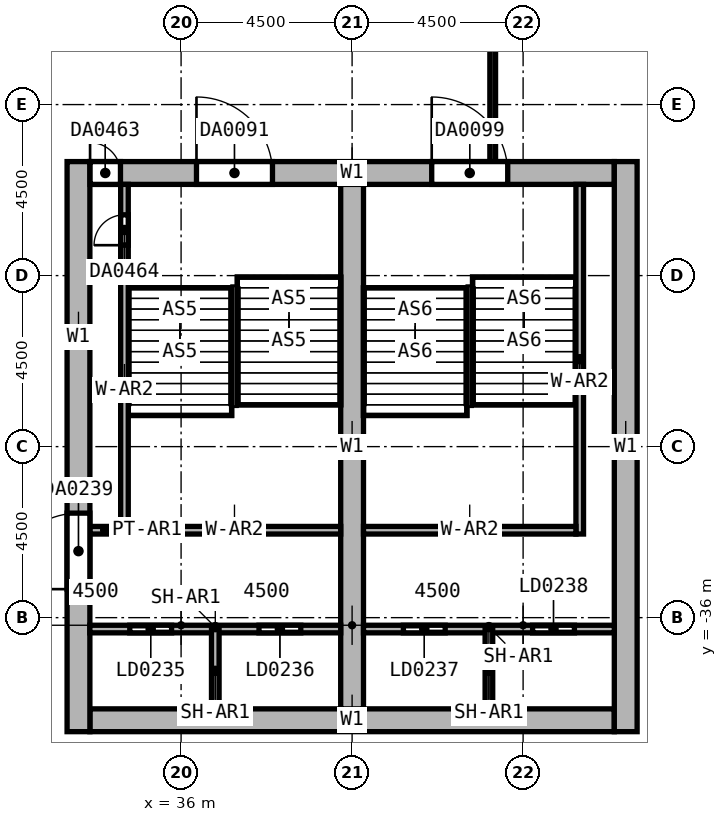
"""IFC4 building model, lengths in metres.
Left out: names, types, materials, properties, quantities, classifications, styles, units other than length and angle.
Written with IfcOpenShell. Run it as: python <this file> out.ifc"""

import sys

from ifc_helpers import new_model, si_unit, direction, frame, frame_2d, origin, place, context, subcontext, project, spatial, rectangle, extrude, element, fill, save


model = new_model("IFC4")
c1 = context("Model", 3, precision=1e-05, world=origin(), true_north=direction((0.0, 1.0)))
c2 = subcontext(c1, "Body", "Model", "MODEL_VIEW")
j1 = project(units=[si_unit("LENGTHUNIT", "METRE"), si_unit("PLANEANGLEUNIT", "RADIAN")], contexts=[c1])
p1 = place(None, origin())
s1 = spatial("IfcSite", under=j1, at=p1, CompositionType="ELEMENT")
p2 = place(p1, origin())
s2 = spatial("IfcBuilding", under=s1, at=p2, CompositionType="ELEMENT")
p3 = place(p2, frame((0.0, 0.0, 44.0)))
s3 = spatial("IfcBuildingStorey", under=s2, at=p3, CompositionType="ELEMENT", Elevation=44.0)
p4 = place(p3, frame((33.6, -24.3, 0.0), z_axis=(0.0, 0.0, 1.0), x_axis=(1.0, 0.0, 0.0)))
e1 = element("IfcWall", 1, at=p4, inside=s3, PredefinedType="SHEAR", context=c2, shape_type="SweptSolid", body=[
    extrude(rectangle(XDim=13.8, YDim=0.6, at=frame_2d((6.9, 0.0))), origin(), (0.0, 0.0, 1.0), 8.0),
])
p5 = place(p4, frame((2.805, 0.0, 0.0)))
e2 = element("IfcOpeningElement", 2, at=p5, cuts=e1, PredefinedType="OPENING", context=c2, shape_type="SweptSolid", body=[
    extrude(rectangle(XDim=2.0, YDim=2.4, at=frame_2d((1.0, 1.2))), frame((0.0, 0.3, 0.0), z_axis=(0.0, -1.0, 0.0), x_axis=(1.0, 0.0, 0.0)), (0.0, 0.0, 1.0), 0.6),
])
p6 = place(p4, frame((8.995, 0.0, 0.0)))
e3 = element("IfcOpeningElement", 3, at=p6, cuts=e1, PredefinedType="OPENING", context=c2, shape_type="SweptSolid", body=[
    extrude(rectangle(XDim=2.0, YDim=2.4, at=frame_2d((1.0, 1.2))), frame((0.0, 0.3, 0.0), z_axis=(0.0, -1.0, 0.0), x_axis=(1.0, 0.0, 0.0)), (0.0, 0.0, 1.0), 0.6),
])
p7 = place(p4, frame((0.005, 0.0, 0.0)))
e4 = element("IfcOpeningElement", 4, at=p7, cuts=e1, PredefinedType="OPENING", context=c2, shape_type="SweptSolid", body=[
    extrude(rectangle(XDim=0.8, YDim=2.1, at=frame_2d((0.4, 1.05))), frame((0.0, 0.3, 0.0), z_axis=(0.0, -1.0, 0.0), x_axis=(1.0, 0.0, 0.0)), (0.0, 0.0, 1.0), 0.6),
])
p8 = place(p3, frame((33.6, -38.7, 0.0), z_axis=(0.0, 0.0, 1.0), x_axis=(1.0, 0.0, 0.0)))
e5 = element("IfcWall", 5, at=p8, inside=s3, PredefinedType="SHEAR", context=c2, shape_type="SweptSolid", body=[
    extrude(rectangle(XDim=13.8, YDim=0.6, at=frame_2d((6.9, 0.0))), origin(), (0.0, 0.0, 1.0), 8.0),
])
p9 = place(p3, frame((33.3, -39.0, 0.0), z_axis=(0.0, 0.0, 1.0), x_axis=(0.0, 1.0, 0.0)))
e6 = element("IfcWall", 6, at=p9, inside=s3, PredefinedType="SHEAR", context=c2, shape_type="SweptSolid", body=[
    extrude(rectangle(XDim=15.0, YDim=0.6, at=frame_2d((7.5, 0.0))), origin(), (0.0, 0.0, 1.0), 8.0),
])
p10 = place(p9, frame((3.75, 0.0, 0.0)))
e7 = element("IfcOpeningElement", 7, at=p10, cuts=e6, PredefinedType="OPENING", context=c2, shape_type="SweptSolid", body=[
    extrude(rectangle(XDim=2.0, YDim=2.4, at=frame_2d((1.0, 1.2))), frame((0.0, 0.3, 0.0), z_axis=(0.0, -1.0, 0.0), x_axis=(1.0, 0.0, 0.0)), (0.0, 0.0, 1.0), 0.6),
])
p11 = place(p3, frame((47.7, -39.0, 0.0), z_axis=(0.0, 0.0, 1.0), x_axis=(0.0, 1.0, 0.0)))
e8 = element("IfcWall", 8, at=p11, inside=s3, PredefinedType="SHEAR", context=c2, shape_type="SweptSolid", body=[
    extrude(rectangle(XDim=15.0, YDim=0.6, at=frame_2d((7.5, 0.0))), origin(), (0.0, 0.0, 1.0), 8.0),
])
p12 = place(p3, frame((40.5, -38.4, 0.0), z_axis=(0.0, 0.0, 1.0), x_axis=(0.0, 1.0, 0.0)))
e9 = element("IfcWall", 9, at=p12, inside=s3, PredefinedType="SHEAR", context=c2, shape_type="SweptSolid", body=[
    extrude(rectangle(XDim=13.8, YDim=0.6, at=frame_2d((6.9, 0.0))), origin(), (0.0, 0.0, 1.0), 8.0),
])
p13 = place(p3, frame((34.51, -33.8, 0.0), z_axis=(0.0, 0.0, 1.0), x_axis=(0.0, 1.0, 0.0)))
e10 = element("IfcWall", 10, at=p13, inside=s3, PredefinedType="SOLIDWALL", context=c2, shape_type="SweptSolid", body=[
    extrude(rectangle(XDim=9.2, YDim=0.2, at=frame_2d((4.6, 0.0))), origin(), (0.0, 0.0, 1.0), 8.0),
])
p14 = place(p13, frame((7.6, 0.0, 0.0)))
e11 = element("IfcOpeningElement", 11, at=p14, cuts=e10, PredefinedType="OPENING", context=c2, shape_type="SweptSolid", body=[
    extrude(rectangle(XDim=0.8, YDim=2.1, at=frame_2d((0.4, 1.05))), frame((0.0, 0.1, 0.0), z_axis=(0.0, -1.0, 0.0), x_axis=(1.0, 0.0, 0.0)), (0.0, 0.0, 1.0), 0.2),
])
p15 = place(p3, frame((34.61, -33.7, 0.0), z_axis=(0.0, 0.0, 1.0), x_axis=(1.0, 0.0, 0.0)))
e12 = element("IfcWall", 12, at=p15, inside=s3, PredefinedType="SOLIDWALL", context=c2, shape_type="SweptSolid", body=[
    extrude(rectangle(XDim=5.59, YDim=0.2, at=frame_2d((2.795, 0.0))), origin(), (0.0, 0.0, 1.0), 8.0),
])
p16 = place(p3, frame((46.49, -33.8, 0.0), z_axis=(0.0, 0.0, 1.0), x_axis=(0.0, 1.0, 0.0)))
e13 = element("IfcWall", 13, at=p16, inside=s3, PredefinedType="SOLIDWALL", context=c2, shape_type="SweptSolid", body=[
    extrude(rectangle(XDim=9.2, YDim=0.2, at=frame_2d((4.6, 0.0))), origin(), (0.0, 0.0, 1.0), 8.0),
])
p17 = place(p3, frame((40.8, -33.7, 0.0), z_axis=(0.0, 0.0, 1.0), x_axis=(1.0, 0.0, 0.0)))
e14 = element("IfcWall", 14, at=p17, inside=s3, PredefinedType="SOLIDWALL", context=c2, shape_type="SweptSolid", body=[
    extrude(rectangle(XDim=5.59, YDim=0.2, at=frame_2d((2.795, 0.0))), origin(), (0.0, 0.0, 1.0), 8.0),
])
p18 = place(p3, frame((33.6, -36.3, 0.0), z_axis=(0.0, 0.0, 1.0), x_axis=(1.0, 0.0, 0.0)))
e15 = element("IfcWall", 15, at=p18, inside=s3, PredefinedType="SHEAR", context=c2, shape_type="SweptSolid", body=[
    extrude(rectangle(XDim=6.6, YDim=0.2, at=frame_2d((3.3, 0.0))), origin(), (0.0, 0.0, 1.0), 8.0),
])
p19 = place(p18, frame((1.05, 0.0, 0.0)))
e16 = element("IfcOpeningElement", 16, at=p19, cuts=e15, PredefinedType="OPENING", context=c2, shape_type="SweptSolid", body=[
    extrude(rectangle(XDim=1.1, YDim=2.4, at=frame_2d((0.55, 1.2))), frame((0.0, 0.1, 0.0), z_axis=(0.0, -1.0, 0.0), x_axis=(1.0, 0.0, 0.0)), (0.0, 0.0, 1.0), 0.2),
])
p20 = place(p18, frame((4.45, 0.0, 0.0)))
e17 = element("IfcOpeningElement", 17, at=p20, cuts=e15, PredefinedType="OPENING", context=c2, shape_type="SweptSolid", body=[
    extrude(rectangle(XDim=1.1, YDim=2.4, at=frame_2d((0.55, 1.2))), frame((0.0, 0.1, 0.0), z_axis=(0.0, -1.0, 0.0), x_axis=(1.0, 0.0, 0.0)), (0.0, 0.0, 1.0), 0.2),
])
p21 = place(p3, frame((40.8, -36.3, 0.0), z_axis=(0.0, 0.0, 1.0), x_axis=(1.0, 0.0, 0.0)))
e18 = element("IfcWall", 18, at=p21, inside=s3, PredefinedType="SHEAR", context=c2, shape_type="SweptSolid", body=[
    extrude(rectangle(XDim=6.6, YDim=0.2, at=frame_2d((3.3, 0.0))), origin(), (0.0, 0.0, 1.0), 8.0),
])
p22 = place(p21, frame((1.05, 0.0, 0.0)))
e19 = element("IfcOpeningElement", 19, at=p22, cuts=e18, PredefinedType="OPENING", context=c2, shape_type="SweptSolid", body=[
    extrude(rectangle(XDim=1.1, YDim=2.4, at=frame_2d((0.55, 1.2))), frame((0.0, 0.1, 0.0), z_axis=(0.0, -1.0, 0.0), x_axis=(1.0, 0.0, 0.0)), (0.0, 0.0, 1.0), 0.2),
])
p23 = place(p21, frame((4.45, 0.0, 0.0)))
e20 = element("IfcOpeningElement", 20, at=p23, cuts=e18, PredefinedType="OPENING", context=c2, shape_type="SweptSolid", body=[
    extrude(rectangle(XDim=1.1, YDim=2.4, at=frame_2d((0.55, 1.2))), frame((0.0, 0.1, 0.0), z_axis=(0.0, -1.0, 0.0), x_axis=(1.0, 0.0, 0.0)), (0.0, 0.0, 1.0), 0.2),
])
for number, where, z_axis, x_axis in (
    (21, (36.9, -38.4, 0.0), (0.0, 0.0, 1.0), (0.0, 1.0, 0.0)),
    (22, (44.1, -38.4, 0.0), (0.0, 0.0, 1.0), (0.0, 1.0, 0.0)),
):
    element("IfcWall", number, at=place(p3, frame(where, z_axis=z_axis, x_axis=x_axis)), inside=s3, PredefinedType="SHEAR", context=c2, shape_type="SweptSolid", body=[
        extrude(rectangle(XDim=2.1, YDim=0.2, at=frame_2d((1.05, 0.0))), origin(), (0.0, 0.0, 1.0), 8.0),
    ])
p24 = place(p3, frame((33.6, -33.7, 0.0), z_axis=(0.0, 0.0, 1.0), x_axis=(1.0, 0.0, 0.0)))
e23 = element("IfcWall", 23, at=p24, inside=s3, PredefinedType="PARTITIONING", context=c2, shape_type="SweptSolid", body=[
    extrude(rectangle(XDim=0.81, YDim=0.2, at=frame_2d((0.405, 0.0))), origin(), (0.0, 0.0, 1.0), 8.0),
])
p25 = place(p3, frame((44.2, -24.0, 0.0), z_axis=(0.0, 0.0, 1.0), x_axis=(0.0, 1.0, 0.0)))
e24 = element("IfcWall", 24, at=p25, inside=s3, PredefinedType="SOLIDWALL", context=c2, shape_type="SweptSolid", body=[
    extrude(rectangle(XDim=9.0, YDim=0.15, at=frame_2d((4.5, 0.0))), origin(), (0.0, 0.0, 1.0), 7.7),
])
p26 = place(p5, frame((2.0, 0.0, 0.0), z_axis=(0.0, 0.0, 1.0), x_axis=(-1.0, 0.0, 0.0)))
e25 = element("IfcDoor", 25, at=p26, inside=s3, OperationType="DOUBLE_DOOR_SINGLE_SWING", PredefinedType="DOOR", context=c2, shape_type="SweptSolid", body=[
    extrude(rectangle(XDim=2.0, YDim=2.4, at=frame_2d((1.0, 1.2))), frame((0.0, 0.025, 0.0), z_axis=(0.0, -1.0, 0.0), x_axis=(1.0, 0.0, 0.0)), (0.0, 0.0, 1.0), 0.05),
])
fill(e2, e25)
p27 = place(p6, frame((2.0, 0.0, 0.0), z_axis=(0.0, 0.0, 1.0), x_axis=(-1.0, 0.0, 0.0)))
e26 = element("IfcDoor", 26, at=p27, inside=s3, OperationType="DOUBLE_DOOR_SINGLE_SWING", PredefinedType="DOOR", context=c2, shape_type="SweptSolid", body=[
    extrude(rectangle(XDim=2.0, YDim=2.4, at=frame_2d((1.0, 1.2))), frame((0.0, 0.025, 0.0), z_axis=(0.0, -1.0, 0.0), x_axis=(1.0, 0.0, 0.0)), (0.0, 0.0, 1.0), 0.05),
])
fill(e3, e26)
p28 = place(p19, frame((1.1, 0.0, 0.0), z_axis=(0.0, 0.0, 1.0), x_axis=(-1.0, 0.0, 0.0)))
e27 = element("IfcDoor", 27, at=p28, inside=s3, OperationType="DOUBLE_DOOR_SLIDING", PredefinedType="DOOR", context=c2, shape_type="SweptSolid", body=[
    extrude(rectangle(XDim=1.1, YDim=2.4, at=frame_2d((0.55, 1.2))), frame((0.0, 0.025, 0.0), z_axis=(0.0, -1.0, 0.0), x_axis=(1.0, 0.0, 0.0)), (0.0, 0.0, 1.0), 0.05),
])
fill(e16, e27)
p29 = place(p20, frame((1.1, 0.0, 0.0), z_axis=(0.0, 0.0, 1.0), x_axis=(-1.0, 0.0, 0.0)))
e28 = element("IfcDoor", 28, at=p29, inside=s3, OperationType="DOUBLE_DOOR_SLIDING", PredefinedType="DOOR", context=c2, shape_type="SweptSolid", body=[
    extrude(rectangle(XDim=1.1, YDim=2.4, at=frame_2d((0.55, 1.2))), frame((0.0, 0.025, 0.0), z_axis=(0.0, -1.0, 0.0), x_axis=(1.0, 0.0, 0.0)), (0.0, 0.0, 1.0), 0.05),
])
fill(e17, e28)
p30 = place(p22, frame((1.1, 0.0, 0.0), z_axis=(0.0, 0.0, 1.0), x_axis=(-1.0, 0.0, 0.0)))
e29 = element("IfcDoor", 29, at=p30, inside=s3, OperationType="DOUBLE_DOOR_SLIDING", PredefinedType="DOOR", context=c2, shape_type="SweptSolid", body=[
    extrude(rectangle(XDim=1.1, YDim=2.4, at=frame_2d((0.55, 1.2))), frame((0.0, 0.025, 0.0), z_axis=(0.0, -1.0, 0.0), x_axis=(1.0, 0.0, 0.0)), (0.0, 0.0, 1.0), 0.05),
])
fill(e19, e29)
p31 = place(p23, frame((1.1, 0.0, 0.0), z_axis=(0.0, 0.0, 1.0), x_axis=(-1.0, 0.0, 0.0)))
e30 = element("IfcDoor", 30, at=p31, inside=s3, OperationType="DOUBLE_DOOR_SLIDING", PredefinedType="DOOR", context=c2, shape_type="SweptSolid", body=[
    extrude(rectangle(XDim=1.1, YDim=2.4, at=frame_2d((0.55, 1.2))), frame((0.0, 0.025, 0.0), z_axis=(0.0, -1.0, 0.0), x_axis=(1.0, 0.0, 0.0)), (0.0, 0.0, 1.0), 0.05),
])
fill(e20, e30)
p32 = place(p10, origin())
e31 = element("IfcDoor", 31, at=p32, inside=s3, OperationType="DOUBLE_DOOR_SINGLE_SWING", PredefinedType="DOOR", context=c2, shape_type="SweptSolid", body=[
    extrude(rectangle(XDim=2.0, YDim=2.4, at=frame_2d((1.0, 1.2))), frame((0.0, 0.025, 0.0), z_axis=(0.0, -1.0, 0.0), x_axis=(1.0, 0.0, 0.0)), (0.0, 0.0, 1.0), 0.05),
])
fill(e7, e31)
p33 = place(p7, origin())
e32 = element("IfcDoor", 32, at=p33, inside=s3, OperationType="SINGLE_SWING_LEFT", PredefinedType="DOOR", context=c2, shape_type="SweptSolid", body=[
    extrude(rectangle(XDim=0.8, YDim=2.1, at=frame_2d((0.4, 1.05))), frame((0.0, 0.025, 0.0), z_axis=(0.0, -1.0, 0.0), x_axis=(1.0, 0.0, 0.0)), (0.0, 0.0, 1.0), 0.05),
])
fill(e4, e32)
p34 = place(p14, origin())
e33 = element("IfcDoor", 33, at=p34, inside=s3, OperationType="SINGLE_SWING_LEFT", PredefinedType="DOOR", context=c2, shape_type="SweptSolid", body=[
    extrude(rectangle(XDim=0.8, YDim=2.1, at=frame_2d((0.4, 1.05))), frame((0.0, 0.025, 0.0), z_axis=(0.0, -1.0, 0.0), x_axis=(1.0, 0.0, 0.0)), (0.0, 0.0, 1.0), 0.05),
])
fill(e11, e33)
save(model, sys.argv[1])
